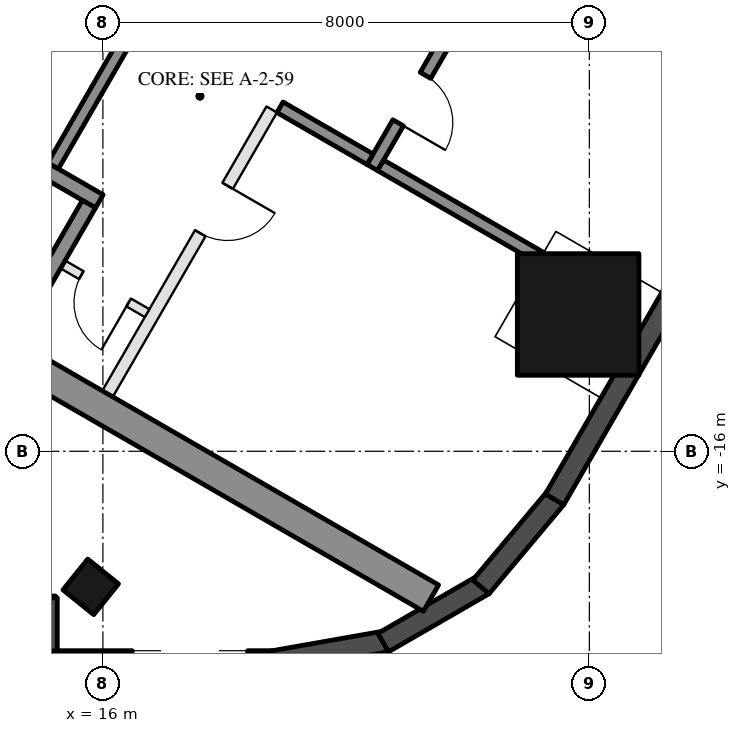
"""IFC4 building model, lengths in metres.
Left out: names, types, materials, properties, quantities, classifications, styles, units other than length and angle.
Written with IfcOpenShell. Run it as: python <this file> out.ifc"""

import sys

from ifc_helpers import new_model, si_unit, direction, frame, frame_2d, origin, origin_2d, place, context, subcontext, project, spatial, rectangle, hollow_rectangle, extrude, boolean, halfspace, element, fill, save


model = new_model("IFC4")
c1 = context("Model", 3, precision=1e-05, world=origin(), true_north=direction((0.0, 1.0)))
c2 = subcontext(c1, "Body", "Model", "MODEL_VIEW")
j1 = project(units=[si_unit("LENGTHUNIT", "METRE"), si_unit("PLANEANGLEUNIT", "RADIAN")], contexts=[c1])
p1 = place(None, origin())
s1 = spatial("IfcSite", under=j1, at=p1, CompositionType="ELEMENT")
p2 = place(p1, origin())
s2 = spatial("IfcBuilding", under=s1, at=p2, CompositionType="ELEMENT")
p3 = place(p2, frame((0.0, 0.0, 254.1)))
s3 = spatial("IfcBuildingStorey", under=s2, at=p3, CompositionType="ELEMENT", Elevation=254.1)
p4 = place(p3, frame((15.8, -18.23, 0.0), z_axis=(-0.121069901949, 0.150398600122, 0.981184151892), x_axis=(0.992602524484, 0.009308864005, 0.121051945213)))
e1 = element("IfcColumn", 1, at=p4, inside=s3, PredefinedType="COLUMN", context=c2, shape_type="SweptSolid", body=[
    boolean("DIFFERENCE", boolean("DIFFERENCE", extrude(hollow_rectangle(XDim=0.65, YDim=0.65, WallThickness=0.03, at=origin_2d()), origin(), (0.0, 0.0, 1.0), 3.771), halfspace(frame((0.0, 0.0, 0.047), z_axis=(0.0, 0.0, 1.0), x_axis=(1.0, 0.0, 0.0)), True)), halfspace(frame((0.0, 0.0, 3.724), z_axis=(0.0, 0.0, 1.0), x_axis=(1.0, 0.0, 0.0)), False)),
])
p5 = place(p3, frame((23.816, -13.75, 0.0), z_axis=(-0.188199890685, 0.108656131275, 0.976101760209), x_axis=(-0.499981359081, -0.866036165848, 3.792844e-06)))
e2 = element("IfcColumn", 2, at=p5, inside=s3, PredefinedType="COLUMN", context=c2, shape_type="SweptSolid", body=[
    boolean("DIFFERENCE", boolean("DIFFERENCE", extrude(hollow_rectangle(XDim=2.0, YDim=2.0, WallThickness=0.05, at=origin_2d()), origin(), (0.0, 0.0, 1.0), 3.791), halfspace(frame((0.0, 0.0, 0.112), z_axis=(0.0, 0.0, 1.0), x_axis=(1.0, 0.0, 0.0)), True)), halfspace(frame((0.0, 0.0, 3.678), z_axis=(0.0, 0.0, 1.0), x_axis=(1.0, 0.0, 0.0)), False)),
])
p6 = place(p3, frame((8.48, -18.555, 0.0), z_axis=(0.0, 0.0, 1.0), x_axis=(1.0, 0.0, 0.0)))
e3 = element("IfcWall", 3, at=p6, inside=s3, PredefinedType="SOLIDWALL", context=c2, shape_type="SweptSolid", body=[
    extrude(rectangle(XDim=6.74, YDim=0.35, at=frame_2d((3.37, 0.0))), origin(), (0.0, 0.0, 1.0), 3.55),
])
p7 = place(p6, frame((3.57, 0.0, 0.0)))
e4 = element("IfcOpeningElement", 4, at=p7, cuts=e3, PredefinedType="OPENING", context=c2, shape_type="SweptSolid", body=[
    extrude(rectangle(XDim=2.4, YDim=2.4, at=frame_2d((1.2, 1.2))), frame((0.0, 0.185, 0.0), z_axis=(0.0, -1.0, 0.0), x_axis=(1.0, 0.0, 0.0)), (0.0, 0.0, 1.0), 0.37),
])
p8 = place(p6, frame((0.32, 0.0, 0.3)))
e5 = element("IfcOpeningElement", 5, at=p8, cuts=e3, PredefinedType="OPENING", context=c2, shape_type="SweptSolid", body=[
    extrude(rectangle(XDim=2.9, YDim=2.65, at=frame_2d((1.45, 1.325))), frame((0.0, 0.185, 0.0), z_axis=(0.0, -1.0, 0.0), x_axis=(1.0, 0.0, 0.0)), (0.0, 0.0, 1.0), 0.37),
])
p9 = place(p3, frame((15.075, -18.41, 0.0), z_axis=(0.0, 0.0, 1.0), x_axis=(0.0, -1.0, 0.0)))
e6 = element("IfcWall", 6, at=p9, inside=s3, PredefinedType="SOLIDWALL", context=c2, shape_type="SweptSolid", body=[
    extrude(rectangle(XDim=1.22, YDim=0.35, at=frame_2d((0.61, 0.0))), origin(), (0.0, 0.0, 1.0), 3.55),
])
p10 = place(p3, frame((14.9, -19.455, 0.0), z_axis=(0.0, 0.0, 1.0), x_axis=(1.0, 0.0, 0.0)))
e7 = element("IfcWall", 7, at=p10, inside=s3, PredefinedType="SOLIDWALL", context=c2, shape_type="SweptSolid", body=[
    extrude(rectangle(XDim=3.916, YDim=0.35, at=frame_2d((1.958, 0.0))), origin(), (0.0, 0.0, 1.0), 3.55),
])
p11 = place(p10, frame((1.581, 0.0, 0.3)))
e8 = element("IfcOpeningElement", 8, at=p11, cuts=e7, PredefinedType="OPENING", context=c2, shape_type="SweptSolid", body=[
    extrude(rectangle(XDim=1.9, YDim=2.65, at=frame_2d((0.95, 1.325))), frame((0.0, 0.185, 0.0), z_axis=(0.0, -1.0, 0.0), x_axis=(1.0, 0.0, 0.0)), (0.0, 0.0, 1.0), 0.37),
])
p12 = place(p3, frame((18.785, -19.458, 0.0), z_axis=(0.0, 0.0, 1.0), x_axis=(0.984798995425, 0.173697837091, 0.0)))
e9 = element("IfcWall", 9, at=p12, inside=s3, PredefinedType="SOLIDWALL", context=c2, shape_type="SweptSolid", body=[
    extrude(rectangle(XDim=1.91, YDim=0.35, at=frame_2d((0.955, 0.0))), origin(), (0.0, 0.0, 1.0), 3.55),
])
for number, where, z_axis, x_axis in (
    (10, (20.61, -19.147, 0.0), (0.0, 0.0, 1.0), (0.866, 0.5, 0.0)),
    (11, (22.217, -18.231, 0.0), (0.0, 0.0, 1.0), (0.643, 0.766, 0.0)),
):
    element("IfcWall", number, at=place(p3, frame(where, z_axis=z_axis, x_axis=x_axis)), inside=s3, PredefinedType="SOLIDWALL", context=c2, shape_type="SweptSolid", body=[
        extrude(rectangle(XDim=1.91, YDim=0.35, at=frame_2d((0.955, 0.0))), origin(), (0.0, 0.0, 1.0), 3.55),
    ])
p13 = place(p3, frame((23.427, -16.792, 0.0), z_axis=(0.0, 0.0, 1.0), x_axis=(0.500018773155, 0.866014564827, 0.0)))
e12 = element("IfcWall", 12, at=p13, inside=s3, PredefinedType="SOLIDWALL", context=c2, shape_type="SweptSolid", body=[
    extrude(rectangle(XDim=5.658, YDim=0.35, at=frame_2d((2.829, 0.0))), origin(), (0.0, 0.0, 1.0), 3.55),
])
for number, where, z_axis, x_axis in (
    (13, (8.547, -10.997, 0.0), (0.0, 0.0, 1.0), (0.866, -0.5, 0.0)),
    (14, (13.797, -1.903, 0.0), (0.0, 0.0, 1.0), (0.866, -0.5, 0.0)),
):
    element("IfcWall", number, at=place(p3, frame(where, z_axis=z_axis, x_axis=x_axis)), inside=s3, PredefinedType="SHEAR", context=c2, shape_type="SweptSolid", body=[
        extrude(rectangle(XDim=14.837, YDim=0.5, at=frame_2d((7.418, 0.0))), origin(), (0.0, 0.0, 1.0), 3.5),
    ])
p14 = place(p3, frame((10.356, -8.664, 0.0), z_axis=(0.0, 0.0, 1.0), x_axis=(0.866028629588, -0.499994412703, 0.0)))
e15 = element("IfcWall", 15, at=p14, inside=s3, PredefinedType="SHEAR", context=c2, shape_type="SweptSolid", body=[
    extrude(rectangle(XDim=6.45, YDim=0.25, at=frame_2d((3.225, 0.0))), origin(), (0.0, 0.0, 1.0), 3.5),
])
p15 = place(p14, frame((0.3, 0.0, 0.0)))
e16 = element("IfcOpeningElement", 16, at=p15, cuts=e15, PredefinedType="OPENING", context=c2, shape_type="SweptSolid", body=[
    extrude(rectangle(XDim=1.0, YDim=2.1, at=frame_2d((0.5, 1.05))), frame((0.0, 0.135, 0.0), z_axis=(0.0, -1.0, 0.0), x_axis=(1.0, 0.0, 0.0)), (0.0, 0.0, 1.0), 0.27),
])
p16 = place(p3, frame((14.496, -14.143, 0.0), z_axis=(0.0, 0.0, 1.0), x_axis=(0.500062241894, 0.865989465428, 0.0)))
e17 = element("IfcWall", 17, at=p16, inside=s3, PredefinedType="SHEAR", context=c2, shape_type="SweptSolid", body=[
    extrude(rectangle(XDim=2.55, YDim=0.25, at=frame_2d((1.275, 0.0))), origin(), (0.0, 0.0, 1.0), 3.5),
])
p17 = place(p3, frame((15.181, -11.305, 0.0), z_axis=(0.0, 0.0, 1.0), x_axis=(0.49994636267, 0.866056369097, 0.0)))
e18 = element("IfcWall", 18, at=p17, inside=s3, PredefinedType="SHEAR", context=c2, shape_type="SweptSolid", body=[
    extrude(rectangle(XDim=2.8, YDim=0.2, at=frame_2d((1.4, 0.0))), origin(), (0.0, 0.0, 1.0), 3.5),
])
p18 = place(p3, frame((20.43, -11.333, 0.0), z_axis=(0.0, 0.0, 1.0), x_axis=(0.500001309137, 0.866024647952, 0.0)))
e19 = element("IfcWall", 19, at=p18, inside=s3, PredefinedType="SHEAR", context=c2, shape_type="SweptSolid", body=[
    extrude(rectangle(XDim=2.4, YDim=0.2, at=frame_2d((1.2, 0.0))), origin(), (0.0, 0.0, 1.0), 3.5),
])
p19 = place(p18, frame((0.85, 0.0, 0.0)))
e20 = element("IfcOpeningElement", 20, at=p19, cuts=e19, PredefinedType="OPENING", context=c2, shape_type="SweptSolid", body=[
    extrude(rectangle(XDim=0.9, YDim=2.1, at=frame_2d((0.45, 1.05))), frame((0.0, 0.11, 0.0), z_axis=(0.0, -1.0, 0.0), x_axis=(1.0, 0.0, 0.0)), (0.0, 0.0, 1.0), 0.22),
])
p20 = place(p3, frame((18.913, -10.342, 0.0), z_axis=(0.0, 0.0, 1.0), x_axis=(0.866038183914, -0.499977863513, 0.0)))
e21 = element("IfcWall", 21, at=p20, inside=s3, PredefinedType="SHEAR", context=c2, shape_type="SweptSolid", body=[
    extrude(rectangle(XDim=1.71, YDim=0.2, at=frame_2d((0.855, 0.0))), origin(), (0.0, 0.0, 1.0), 3.5),
])
p21 = place(p3, frame((20.567, -11.297, 0.0), z_axis=(0.0, 0.0, 1.0), x_axis=(0.866065229334, -0.49993101378, 0.0)))
e22 = element("IfcWall", 22, at=p21, inside=s3, PredefinedType="SHEAR", context=c2, shape_type="SweptSolid", body=[
    extrude(rectangle(XDim=3.04, YDim=0.2, at=frame_2d((1.52, 0.0))), origin(), (0.0, 0.0, 1.0), 3.5),
])
p22 = place(p3, frame((16.076, -15.055, 0.0), z_axis=(0.0, 0.0, 1.0), x_axis=(0.499995103361, 0.866028230842, 0.0)))
e23 = element("IfcWall", 23, at=p22, inside=s3, PredefinedType="PARTITIONING", context=c2, shape_type="SweptSolid", body=[
    extrude(rectangle(XDim=5.4, YDim=0.2, at=frame_2d((2.7, 0.0))), origin(), (0.0, 0.0, 1.0), 3.5),
])
p23 = place(p22, frame((3.05, 0.0, 0.0)))
e24 = element("IfcOpeningElement", 24, at=p23, cuts=e23, PredefinedType="OPENING", context=c2, shape_type="SweptSolid", body=[
    extrude(rectangle(XDim=0.9, YDim=2.1, at=frame_2d((0.45, 1.05))), frame((0.0, 0.11, 0.0), z_axis=(0.0, -1.0, 0.0), x_axis=(1.0, 0.0, 0.0)), (0.0, 0.0, 1.0), 0.22),
])
p24 = place(p3, frame((15.342, -12.928, 0.0), z_axis=(0.0, 0.0, 1.0), x_axis=(0.865989903783, -0.500061482766, 0.0)))
e25 = element("IfcWall", 25, at=p24, inside=s3, PredefinedType="PARTITIONING", context=c2, shape_type="SweptSolid", body=[
    extrude(rectangle(XDim=1.6, YDim=0.15, at=frame_2d((0.8, 0.0))), origin(), (0.0, 0.0, 1.0), 3.5),
])
p25 = place(p24, frame((0.35, 0.0, 0.0)))
e26 = element("IfcOpeningElement", 26, at=p25, cuts=e25, PredefinedType="OPENING", context=c2, shape_type="SweptSolid", body=[
    extrude(rectangle(XDim=0.9, YDim=2.1, at=frame_2d((0.45, 1.05))), frame((0.0, 0.085, 0.0), z_axis=(0.0, -1.0, 0.0), x_axis=(1.0, 0.0, 0.0)), (0.0, 0.0, 1.0), 0.17),
])
p26 = place(p25, frame((0.9, 0.0, 0.0), z_axis=(0.0, 0.0, 1.0), x_axis=(-1.0, 0.0, 0.0)))
e27 = element("IfcDoor", 27, at=p26, inside=s3, OperationType="SINGLE_SWING_LEFT", PredefinedType="DOOR", context=c2, shape_type="SweptSolid", body=[
    extrude(rectangle(XDim=0.9, YDim=2.1, at=frame_2d((0.45, 1.05))), frame((0.0, 0.025, 0.0), z_axis=(0.0, -1.0, 0.0), x_axis=(1.0, 0.0, 0.0)), (0.0, 0.0, 1.0), 0.05),
])
fill(e26, e27)
p27 = place(p19, frame((0.9, 0.0, 0.0), z_axis=(0.0, 0.0, 1.0), x_axis=(-1.0, 0.0, 0.0)))
e28 = element("IfcDoor", 28, at=p27, inside=s3, OperationType="SINGLE_SWING_RIGHT", PredefinedType="DOOR", context=c2, shape_type="SweptSolid", body=[
    extrude(rectangle(XDim=0.9, YDim=2.1, at=frame_2d((0.45, 1.05))), frame((0.0, 0.025, 0.0), z_axis=(0.0, -1.0, 0.0), x_axis=(1.0, 0.0, 0.0)), (0.0, 0.0, 1.0), 0.05),
])
fill(e20, e28)
p28 = place(p23, frame((0.9, 0.0, 0.0), z_axis=(0.0, 0.0, 1.0), x_axis=(-1.0, 0.0, 0.0)))
e29 = element("IfcDoor", 29, at=p28, inside=s3, OperationType="SINGLE_SWING_LEFT", PredefinedType="DOOR", context=c2, shape_type="SweptSolid", body=[
    extrude(rectangle(XDim=0.9, YDim=2.1, at=frame_2d((0.45, 1.05))), frame((0.0, 0.025, 0.0), z_axis=(0.0, -1.0, 0.0), x_axis=(1.0, 0.0, 0.0)), (0.0, 0.0, 1.0), 0.05),
])
fill(e24, e29)
save(model, sys.argv[1])
